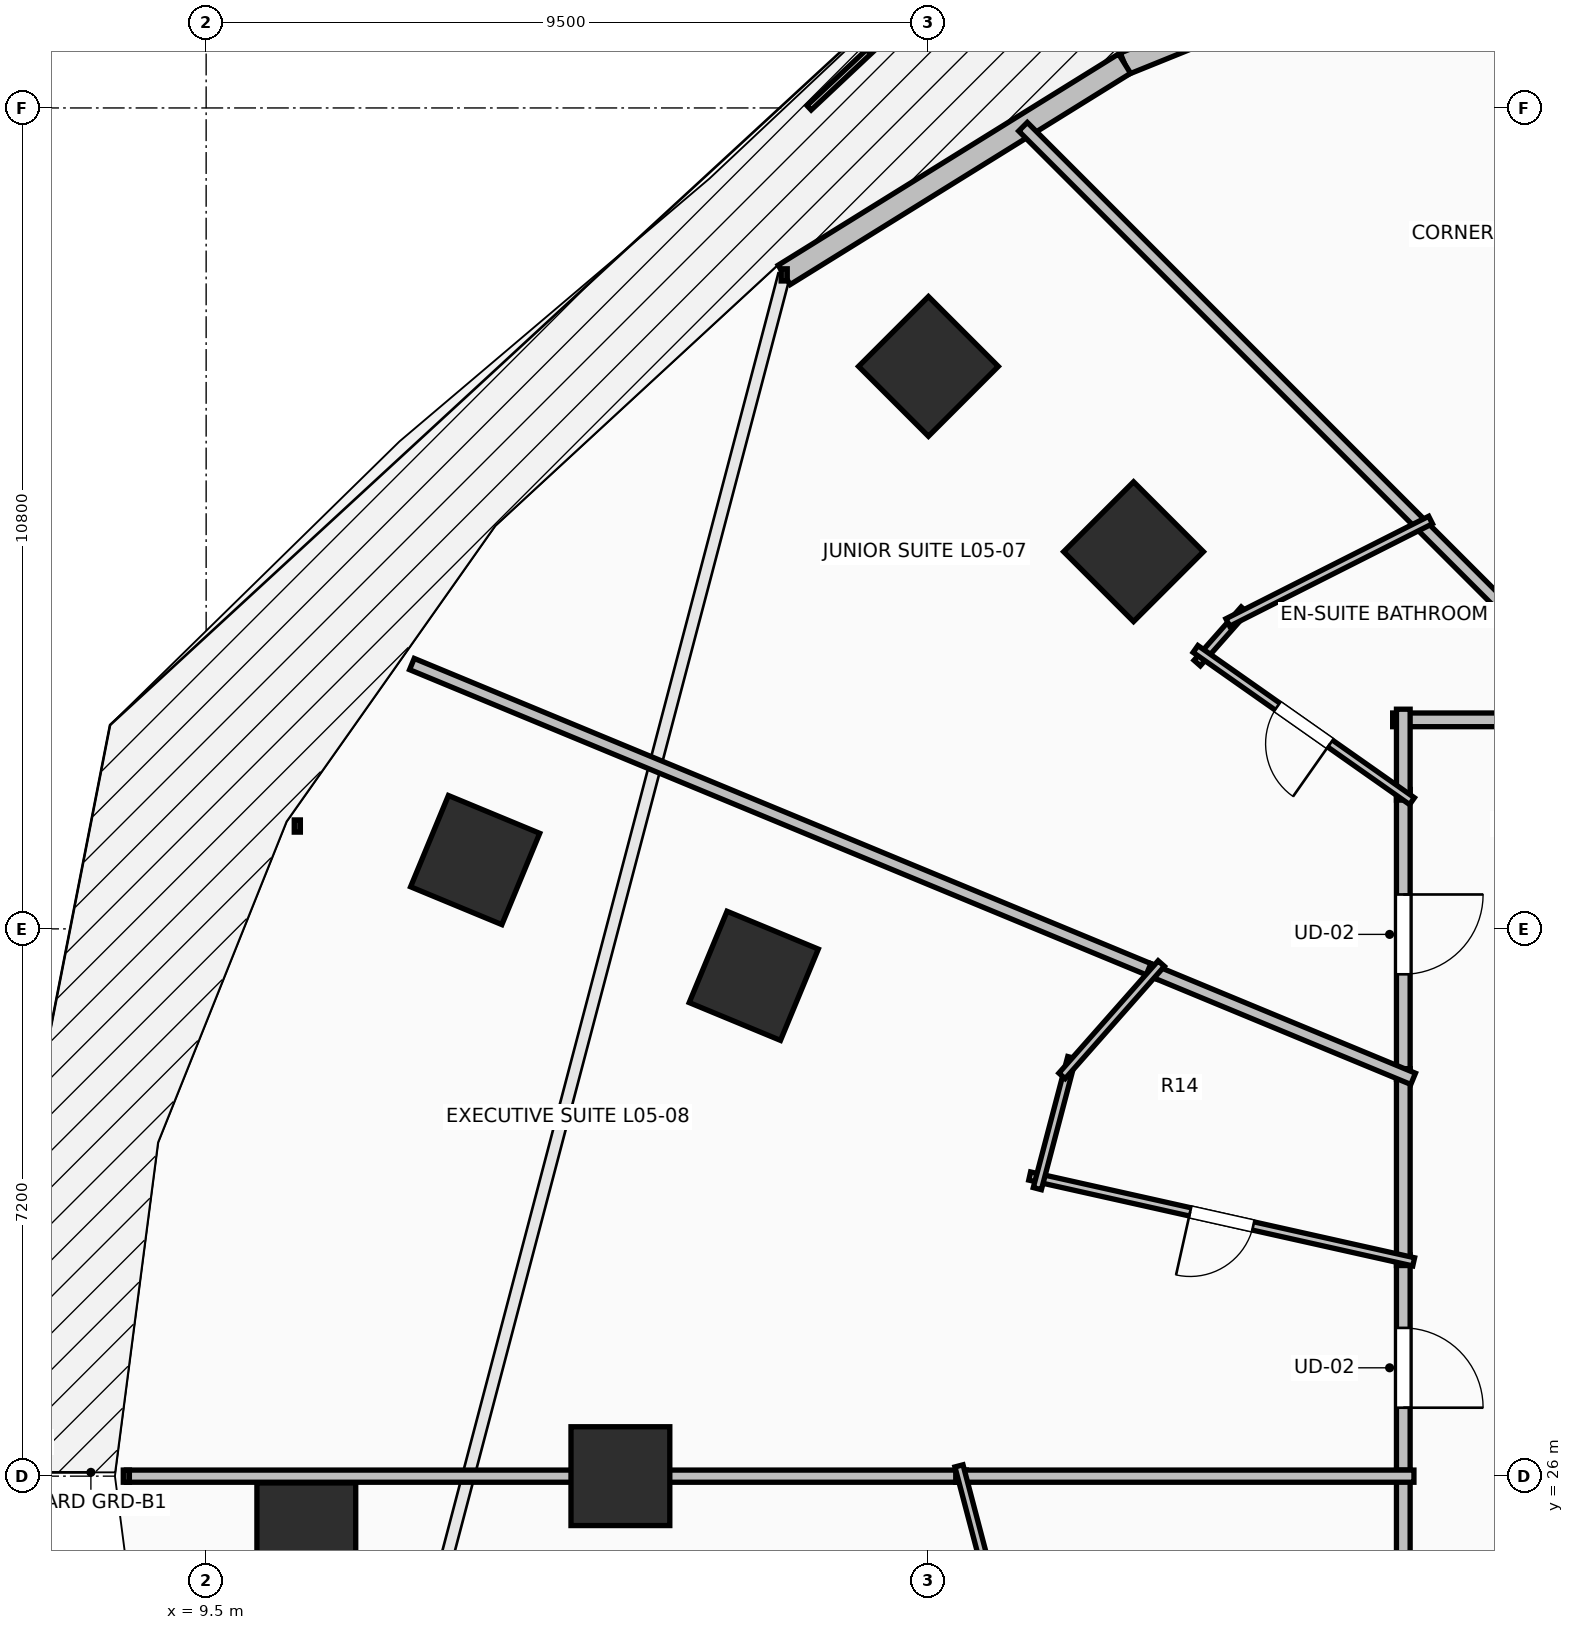
"""IFC4 building model, lengths in metres.
Left out: names, types, materials, properties, quantities, classifications, styles, units other than length and angle.
Written with IfcOpenShell. Run it as: python <this file> out.ifc"""

import sys

from ifc_helpers import new_model, si_unit, direction, frame, frame_2d, origin, origin_2d, place, context, subcontext, project, spatial, rectangle, extrude, element, fill, save


model = new_model("IFC4")
c1 = context("Model", 3, precision=1e-05, world=origin(), true_north=direction((0.0, 1.0)))
c2 = subcontext(c1, "Body", "Model", "MODEL_VIEW")
j1 = project(units=[si_unit("LENGTHUNIT", "METRE"), si_unit("PLANEANGLEUNIT", "RADIAN")], contexts=[c1])
p1 = place(None, origin())
s1 = spatial("IfcSite", under=j1, at=p1, CompositionType="ELEMENT")
p2 = place(p1, origin())
s2 = spatial("IfcBuilding", under=s1, at=p2, CompositionType="ELEMENT")
p3 = place(p2, frame((0.0, 0.0, 24.0)))
s3 = spatial("IfcBuildingStorey", under=s2, at=p3, CompositionType="ELEMENT", Elevation=24.0)
for number, where, z_axis, x_axis in (
    (1, (21.701, 38.162, 0.0), (0.0, 0.0, 1.0), (-0.707, 0.707, 0.0)),
    (2, (16.705, 32.582, 0.0), (0.0, 0.0, 1.0), (-0.924, 0.383, 0.0)),
    (3, (14.95, 26.0, 0.0), (0.0, 0.0, 1.0), (-1.0, 0.0, 0.0)),
    (4, (19.003, 40.6, 0.0), (0.0, 0.0, 1.0), (-0.707, 0.707, 0.0)),
    (5, (13.039, 34.105, 0.0), (0.0, 0.0, 1.0), (-0.924, 0.383, 0.0)),
    (6, (10.818, 25.261, 0.0), (0.0, 0.0, 1.0), (-1.0, 0.0, 0.0)),
):
    element("IfcColumn", number, at=place(p3, frame(where, z_axis=z_axis, x_axis=x_axis)), inside=s3, PredefinedType="COLUMN", context=c2, shape_type="SweptSolid", body=[
        extrude(rectangle(XDim=1.3, YDim=1.3, at=origin_2d()), origin(), (0.0, 0.0, 1.0), 3.5),
    ])
p4 = place(p3, frame((26.692, 46.649, 0.0), z_axis=(0.0, 0.0, 1.0), x_axis=(-0.927095325176, -0.374825636845, 0.0)))
e7 = element("IfcWall", 7, at=p4, inside=s3, PredefinedType="STANDARD", context=c2, shape_type="SweptSolid", body=[
    extrude(rectangle(XDim=5.51, YDim=0.3, at=frame_2d((2.755, 0.0))), origin(), (0.0, 0.0, 1.0), 3.24),
])
p5 = place(p4, frame((1.955, 0.0, 0.0)))
e8 = element("IfcOpeningElement", 8, at=p5, cuts=e7, PredefinedType="OPENING", context=c2, shape_type="SweptSolid", body=[
    extrude(rectangle(XDim=1.6, YDim=2.3, at=frame_2d((0.8, 1.15))), frame((0.0, 0.165, 0.0), z_axis=(0.0, -1.0, 0.0), x_axis=(1.0, 0.0, 0.0)), (0.0, 0.0, 1.0), 0.33),
])
p6 = place(p3, frame((21.583, 44.583, 0.0), z_axis=(0.0, 0.0, 1.0), x_axis=(-0.849633724826, -0.527373239404, 0.0)))
e9 = element("IfcWall", 9, at=p6, inside=s3, PredefinedType="STANDARD", context=c2, shape_type="SweptSolid", body=[
    extrude(rectangle(XDim=5.271, YDim=0.3, at=frame_2d((2.635, 0.0))), origin(), (0.0, 0.0, 1.0), 3.24),
])
p7 = place(p3, frame((25.25, 35.034, 0.0), z_axis=(0.0, 0.0, 1.0), x_axis=(0.0, -1.0, 0.0)))
e10 = element("IfcWall", 10, at=p7, inside=s3, PredefinedType="PARTITIONING", context=c2, shape_type="SweptSolid", body=[
    extrude(rectangle(XDim=3.813, YDim=0.18, at=frame_2d((1.906, 0.0))), origin(), (0.0, 0.0, 1.0), 2.432),
])
p8 = place(p7, frame((1.382, 0.0, 0.0)))
e11 = element("IfcOpeningElement", 11, at=p8, cuts=e10, PredefinedType="OPENING", context=c2, shape_type="SweptSolid", body=[
    extrude(rectangle(XDim=1.05, YDim=2.2, at=frame_2d((0.525, 1.1))), frame((0.0, 0.105, 0.0), z_axis=(0.0, -1.0, 0.0), x_axis=(1.0, 0.0, 0.0)), (0.0, 0.0, 1.0), 0.21),
])
p9 = place(p3, frame((28.105, 35.95, 0.0), z_axis=(0.0, 0.0, 1.0), x_axis=(-1.0, 0.0, 0.0)))
e12 = element("IfcWall", 12, at=p9, inside=s3, PredefinedType="PARTITIONING", context=c2, shape_type="SweptSolid", body=[
    extrude(rectangle(XDim=2.995, YDim=0.18, at=frame_2d((1.498, 0.0))), origin(), (0.0, 0.0, 1.0), 2.432),
])
p10 = place(p3, frame((25.25, 36.09, 0.0), z_axis=(0.0, 0.0, 1.0), x_axis=(0.0, -1.0, 0.0)))
e13 = element("IfcWall", 13, at=p10, inside=s3, PredefinedType="PARTITIONING", context=c2, shape_type="SweptSolid", body=[
    extrude(rectangle(XDim=1.196, YDim=0.18, at=frame_2d((0.598, 0.0))), origin(), (0.0, 0.0, 1.0), 2.432),
])
p11 = place(p3, frame((25.25, 28.911, 0.0), z_axis=(0.0, 0.0, 1.0), x_axis=(0.0, -1.0, 0.0)))
e14 = element("IfcWall", 14, at=p11, inside=s3, PredefinedType="PARTITIONING", context=c2, shape_type="SweptSolid", body=[
    extrude(rectangle(XDim=2.971, YDim=0.18, at=frame_2d((1.485, 0.0))), origin(), (0.0, 0.0, 1.0), 2.432),
])
p12 = place(p11, frame((0.96, 0.0, 0.0)))
e15 = element("IfcOpeningElement", 15, at=p12, cuts=e14, PredefinedType="OPENING", context=c2, shape_type="SweptSolid", body=[
    extrude(rectangle(XDim=1.05, YDim=2.2, at=frame_2d((0.525, 1.1))), frame((0.0, 0.105, 0.0), z_axis=(0.0, -1.0, 0.0), x_axis=(1.0, 0.0, 0.0)), (0.0, 0.0, 1.0), 0.21),
])
p13 = place(p3, frame((25.25, 31.361, 0.0), z_axis=(0.0, 0.0, 1.0), x_axis=(0.0, -1.0, 0.0)))
e16 = element("IfcWall", 16, at=p13, inside=s3, PredefinedType="PARTITIONING", context=c2, shape_type="SweptSolid", body=[
    extrude(rectangle(XDim=2.59, YDim=0.18, at=frame_2d((1.295, 0.0))), origin(), (0.0, 0.0, 1.0), 2.432),
])
p14 = place(p3, frame((25.25, 26.08, 0.0), z_axis=(0.0, 0.0, 1.0), x_axis=(0.0, -1.0, 0.0)))
e17 = element("IfcWall", 17, at=p14, inside=s3, PredefinedType="PARTITIONING", context=c2, shape_type="SweptSolid", body=[
    extrude(rectangle(XDim=2.385, YDim=0.18, at=frame_2d((1.192, 0.0))), origin(), (0.0, 0.0, 1.0), 3.24),
])
p15 = place(p3, frame((20.247, 43.753, 0.0), z_axis=(0.0, 0.0, 1.0), x_axis=(0.707106781187, -0.707106781187, 0.0)))
e18 = element("IfcWall", 18, at=p15, inside=s3, PredefinedType="PARTITIONING", context=c2, shape_type="SweptSolid", body=[
    extrude(rectangle(XDim=11.035, YDim=0.16, at=frame_2d((5.518, 0.0))), origin(), (0.0, 0.0, 1.0), 2.432),
])
p16 = place(p3, frame((22.538, 36.697, 0.0), z_axis=(0.0, 0.0, 1.0), x_axis=(0.662242037053, 0.749289986827, 0.0)))
e19 = element("IfcWall", 19, at=p16, inside=s3, PredefinedType="PARTITIONING", context=c2, shape_type="SweptSolid", body=[
    extrude(rectangle(XDim=0.937, YDim=0.11, at=frame_2d((0.468, 0.0))), origin(), (0.0, 0.0, 1.0), 2.432),
])
p17 = place(p3, frame((22.941, 37.231, 0.0), z_axis=(0.0, 0.0, 1.0), x_axis=(0.892507731149, 0.451032094024, 0.0)))
e20 = element("IfcWall", 20, at=p17, inside=s3, PredefinedType="PARTITIONING", context=c2, shape_type="SweptSolid", body=[
    extrude(rectangle(XDim=2.989, YDim=0.11, at=frame_2d((1.495, 0.0))), origin(), (0.0, 0.0, 1.0), 2.432),
])
p18 = place(p3, frame((25.365, 34.881, 0.0), z_axis=(0.0, 0.0, 1.0), x_axis=(-0.81809360258, 0.575085087111, 0.0)))
e21 = element("IfcWall", 21, at=p18, inside=s3, PredefinedType="PARTITIONING", context=c2, shape_type="SweptSolid", body=[
    extrude(rectangle(XDim=3.481, YDim=0.11, at=frame_2d((1.741, 0.0))), origin(), (0.0, 0.0, 1.0), 2.432),
])
p19 = place(p18, frame((1.316, 0.0, 0.0)))
e22 = element("IfcOpeningElement", 22, at=p19, cuts=e21, PredefinedType="OPENING", context=c2, shape_type="SweptSolid", body=[
    extrude(rectangle(XDim=0.85, YDim=2.1, at=frame_2d((0.425, 1.05))), frame((0.0, 0.07, 0.0), z_axis=(0.0, -1.0, 0.0), x_axis=(1.0, 0.0, 0.0)), (0.0, 0.0, 1.0), 0.14),
])
p20 = place(p3, frame((12.207, 36.684, 0.0), z_axis=(0.0, 0.0, 1.0), x_axis=(0.923876032578, -0.382691881842, 0.0)))
e23 = element("IfcWall", 23, at=p20, inside=s3, PredefinedType="PARTITIONING", context=c2, shape_type="SweptSolid", body=[
    extrude(rectangle(XDim=10.63, YDim=0.16, at=frame_2d((5.315, 0.0))), origin(), (0.0, 0.0, 1.0), 2.624),
])
p21 = place(p3, frame((21.899, 32.669, 0.0), z_axis=(0.0, 0.0, 1.0), x_axis=(0.923843852071, -0.382769561211, 0.0)))
e24 = element("IfcWall", 24, at=p21, inside=s3, PredefinedType="PARTITIONING", context=c2, shape_type="SweptSolid", body=[
    extrude(rectangle(XDim=3.768, YDim=0.16, at=frame_2d((1.884, 0.0))), origin(), (0.0, 0.0, 1.0), 2.922),
])
p22 = place(p3, frame((25.387, 28.82, 0.0), z_axis=(0.0, 0.0, 1.0), x_axis=(-0.975933395621, 0.218068813248, 0.0)))
e25 = element("IfcWall", 25, at=p22, inside=s3, PredefinedType="PARTITIONING", context=c2, shape_type="SweptSolid", body=[
    extrude(rectangle(XDim=5.177, YDim=0.11, at=frame_2d((2.588, 0.0))), origin(), (0.0, 0.0, 1.0), 2.432),
])
p23 = place(p22, frame((2.163, 0.0, 0.0)))
e26 = element("IfcOpeningElement", 26, at=p23, cuts=e25, PredefinedType="OPENING", context=c2, shape_type="SweptSolid", body=[
    extrude(rectangle(XDim=0.85, YDim=2.1, at=frame_2d((0.425, 1.05))), frame((0.0, 0.07, 0.0), z_axis=(0.0, -1.0, 0.0), x_axis=(1.0, 0.0, 0.0)), (0.0, 0.0, 1.0), 0.14),
])
p24 = place(p3, frame((20.435, 29.783, 0.0), z_axis=(0.0, 0.0, 1.0), x_axis=(0.254378671262, 0.967104695267, 0.0)))
e27 = element("IfcWall", 27, at=p24, inside=s3, PredefinedType="PARTITIONING", context=c2, shape_type="SweptSolid", body=[
    extrude(rectangle(XDim=1.782, YDim=0.11, at=frame_2d((0.891, 0.0))), origin(), (0.0, 0.0, 1.0), 2.432),
])
p25 = place(p3, frame((20.76, 31.266, 0.0), z_axis=(0.0, 0.0, 1.0), x_axis=(0.662047420969, 0.749461948593, 0.0)))
e28 = element("IfcWall", 28, at=p25, inside=s3, PredefinedType="PARTITIONING", context=c2, shape_type="SweptSolid", body=[
    extrude(rectangle(XDim=1.972, YDim=0.11, at=frame_2d((0.986, 0.0))), origin(), (0.0, 0.0, 1.0), 3.24),
])
p26 = place(p3, frame((8.451, 26.0, 0.0), z_axis=(0.0, 0.0, 1.0), x_axis=(1.0, 0.0, 0.0)))
e29 = element("IfcWall", 29, at=p26, inside=s3, PredefinedType="PARTITIONING", context=c2, shape_type="SweptSolid", body=[
    extrude(rectangle(XDim=11.051, YDim=0.16, at=frame_2d((5.525, 0.0))), origin(), (0.0, 0.0, 1.0), 2.432),
])
p27 = place(p3, frame((19.362, 26.0, 0.0), z_axis=(0.0, 0.0, 1.0), x_axis=(1.0, 0.0, 0.0)))
e30 = element("IfcWall", 30, at=p27, inside=s3, PredefinedType="PARTITIONING", context=c2, shape_type="SweptSolid", body=[
    extrude(rectangle(XDim=6.028, YDim=0.16, at=frame_2d((3.014, 0.0))), origin(), (0.0, 0.0, 1.0), 2.922),
])
p28 = place(p3, frame((20.291, 22.768, 0.0), z_axis=(0.0, 0.0, 1.0), x_axis=(-0.254476045764, 0.967079077497, 0.0)))
e31 = element("IfcWall", 31, at=p28, inside=s3, PredefinedType="PARTITIONING", context=c2, shape_type="SweptSolid", body=[
    extrude(rectangle(XDim=3.483, YDim=0.11, at=frame_2d((1.741, 0.0))), origin(), (0.0, 0.0, 1.0), 3.24),
])
p29 = place(p8, origin())
e32 = element("IfcDoor", 32, at=p29, inside=s3, OperationType="SINGLE_SWING_LEFT", PredefinedType="DOOR", context=c2, shape_type="SweptSolid", body=[
    extrude(rectangle(XDim=1.05, YDim=2.2, at=frame_2d((0.525, 1.1))), frame((0.0, 0.025, 0.0), z_axis=(0.0, -1.0, 0.0), x_axis=(1.0, 0.0, 0.0)), (0.0, 0.0, 1.0), 0.05),
])
fill(e11, e32)
p30 = place(p12, origin())
e33 = element("IfcDoor", 33, at=p30, inside=s3, OperationType="SINGLE_SWING_RIGHT", PredefinedType="DOOR", context=c2, shape_type="SweptSolid", body=[
    extrude(rectangle(XDim=1.05, YDim=2.2, at=frame_2d((0.525, 1.1))), frame((0.0, 0.025, 0.0), z_axis=(0.0, -1.0, 0.0), x_axis=(1.0, 0.0, 0.0)), (0.0, 0.0, 1.0), 0.05),
])
fill(e15, e33)
p31 = place(p19, origin())
e34 = element("IfcDoor", 34, at=p31, inside=s3, OperationType="SINGLE_SWING_LEFT", PredefinedType="DOOR", context=c2, shape_type="SweptSolid", body=[
    extrude(rectangle(XDim=0.85, YDim=2.1, at=frame_2d((0.425, 1.05))), frame((0.0, 0.025, 0.0), z_axis=(0.0, -1.0, 0.0), x_axis=(1.0, 0.0, 0.0)), (0.0, 0.0, 1.0), 0.05),
])
fill(e22, e34)
p32 = place(p23, origin())
e35 = element("IfcDoor", 35, at=p32, inside=s3, OperationType="SINGLE_SWING_RIGHT", PredefinedType="DOOR", context=c2, shape_type="SweptSolid", body=[
    extrude(rectangle(XDim=0.85, YDim=2.1, at=frame_2d((0.425, 1.05))), frame((0.0, 0.025, 0.0), z_axis=(0.0, -1.0, 0.0), x_axis=(1.0, 0.0, 0.0)), (0.0, 0.0, 1.0), 0.05),
])
fill(e26, e35)
save(model, sys.argv[1])
